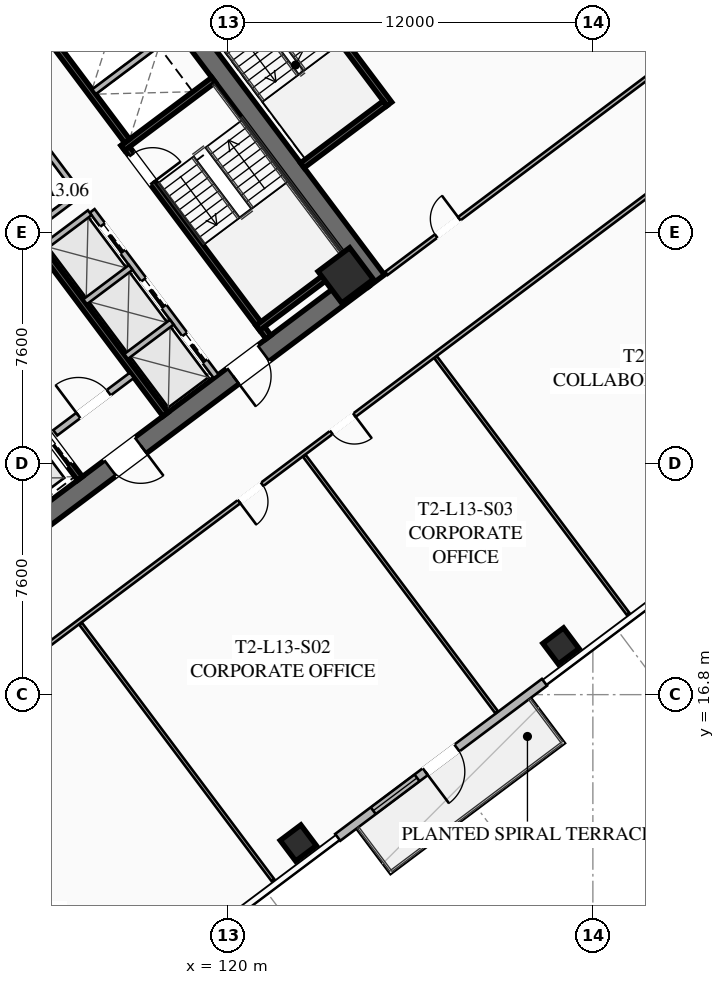
"""IFC4 building model, lengths in metres.
Left out: names, types, materials, properties, quantities, classifications, styles, units other than length and angle.
Written with IfcOpenShell. Run it as: python <this file> out.ifc"""

import sys

from ifc_helpers import new_model, si_unit, direction, frame, frame_2d, origin, origin_2d, place, context, subcontext, project, spatial, rectangle, hollow_rectangle, extrude, element, fill, save


model = new_model("IFC4")
c1 = context("Model", 3, precision=1e-05, world=origin(), true_north=direction((0.0, 1.0)))
c2 = subcontext(c1, "Body", "Model", "MODEL_VIEW")
j1 = project(units=[si_unit("LENGTHUNIT", "METRE"), si_unit("PLANEANGLEUNIT", "RADIAN")], contexts=[c1])
p1 = place(None, origin())
s1 = spatial("IfcSite", under=j1, at=p1, CompositionType="ELEMENT")
p2 = place(p1, origin())
s2 = spatial("IfcBuilding", under=s1, at=p2, CompositionType="ELEMENT")
p3 = place(p2, frame((0.0, 0.0, 53.0)))
s3 = spatial("IfcBuildingStorey", under=s2, at=p3, CompositionType="ELEMENT", Elevation=53.0)
p4 = place(p3, frame((115.524, 42.893, 0.0), z_axis=(0.0, 0.0, 1.0), x_axis=(0.600005007985, -0.799996243986, 0.0)))
e1 = element("IfcWall", 1, at=p4, inside=s3, PredefinedType="SHEAR", context=c2, shape_type="SweptSolid", body=[
    extrude(rectangle(XDim=15.6, YDim=0.65, at=frame_2d((7.8, 0.0))), origin(), (0.0, 0.0, 1.0), 3.55),
])
p5 = place(p3, frame((124.429, 30.478, 0.0), z_axis=(0.0, 0.0, 1.0), x_axis=(-0.799998028465, -0.600002628705, 0.0)))
e2 = element("IfcWall", 2, at=p5, inside=s3, PredefinedType="SHEAR", context=c2, shape_type="SweptSolid", body=[
    extrude(rectangle(XDim=14.86, YDim=0.65, at=frame_2d((7.43, 0.0))), origin(), (0.0, 0.0, 1.0), 3.55),
])
p6 = place(p5, frame((9.13, 0.0, 0.0)))
e3 = element("IfcOpeningElement", 3, at=p6, cuts=e2, PredefinedType="OPENING", context=c2, shape_type="SweptSolid", body=[
    extrude(rectangle(XDim=1.25, YDim=2.25, at=frame_2d((0.625, 1.125))), frame((0.0, 0.335, 0.0), z_axis=(0.0, -1.0, 0.0), x_axis=(1.0, 0.0, 0.0)), (0.0, 0.0, 1.0), 0.67),
])
p7 = place(p5, frame((4.08, 0.0, 0.0)))
e4 = element("IfcOpeningElement", 4, at=p7, cuts=e2, PredefinedType="OPENING", context=c2, shape_type="SweptSolid", body=[
    extrude(rectangle(XDim=1.25, YDim=2.25, at=frame_2d((0.625, 1.125))), frame((0.0, 0.335, 0.0), z_axis=(0.0, -1.0, 0.0), x_axis=(1.0, 0.0, 0.0)), (0.0, 0.0, 1.0), 0.67),
])
p8 = place(p3, frame((103.571, 33.522, 0.0), z_axis=(0.0, 0.0, 1.0), x_axis=(0.799998028465, 0.600002628705, 0.0)))
e5 = element("IfcWall", 5, at=p8, inside=s3, PredefinedType="SHEAR", context=c2, shape_type="SweptSolid", body=[
    extrude(rectangle(XDim=14.86, YDim=0.65, at=frame_2d((7.43, 0.0))), origin(), (0.0, 0.0, 1.0), 3.55),
])
p9 = place(p8, frame((4.48, 0.0, 0.0)))
e6 = element("IfcOpeningElement", 6, at=p9, cuts=e5, PredefinedType="OPENING", context=c2, shape_type="SweptSolid", body=[
    extrude(rectangle(XDim=1.25, YDim=2.25, at=frame_2d((0.625, 1.125))), frame((0.0, 0.335, 0.0), z_axis=(0.0, -1.0, 0.0), x_axis=(1.0, 0.0, 0.0)), (0.0, 0.0, 1.0), 0.67),
])
p10 = place(p8, frame((9.53, 0.0, 0.0)))
e7 = element("IfcOpeningElement", 7, at=p10, cuts=e5, PredefinedType="OPENING", context=c2, shape_type="SweptSolid", body=[
    extrude(rectangle(XDim=1.25, YDim=2.25, at=frame_2d((0.625, 1.125))), frame((0.0, 0.335, 0.0), z_axis=(0.0, -1.0, 0.0), x_axis=(1.0, 0.0, 0.0)), (0.0, 0.0, 1.0), 0.67),
])
p11 = place(p3, frame((123.87, 30.59, 0.0), z_axis=(0.0, 0.0, 1.0), x_axis=(0.799999996291, 0.600000004945, 0.0)))
e8 = element("IfcColumn", 8, at=p11, inside=s3, PredefinedType="COLUMN", context=c2, shape_type="SweptSolid", body=[
    extrude(hollow_rectangle(XDim=1.3, YDim=1.3, WallThickness=0.05, at=origin_2d()), origin(), (0.0, 0.0, 1.0), 3.35),
])
for number, where, z_axis, x_axis in (
    (9, (122.31, 11.92, 0.0), (0.0, 0.0, 1.0), (0.8, 0.6, 0.0)),
    (10, (130.95, 18.4, 0.0), (0.0, 0.0, 1.0), (0.8, 0.6, 0.0)),
):
    element("IfcColumn", number, at=place(p3, frame(where, z_axis=z_axis, x_axis=x_axis)), inside=s3, PredefinedType="COLUMN", context=c2, shape_type="SweptSolid", body=[
        extrude(hollow_rectangle(XDim=0.85, YDim=0.85, WallThickness=0.035, at=origin_2d()), origin(), (0.0, 0.0, 1.0), 3.35),
    ])
p12 = place(p3, frame((130.408, 17.206, 0.0), z_axis=(0.0, 0.0, 1.0), x_axis=(-0.799996553335, -0.600004595526, 0.0)))
e11 = element("IfcWall", 11, at=p12, inside=s3, PredefinedType="SOLIDWALL", context=c2, shape_type="SweptSolid", body=[
    extrude(rectangle(XDim=8.5, YDim=0.28, at=frame_2d((4.25, 0.0))), origin(), (0.0, 0.0, 1.0), 3.35),
])
p13 = place(p12, frame((3.6, 0.0, 0.0)))
e12 = element("IfcOpeningElement", 12, at=p13, cuts=e11, PredefinedType="OPENING", context=c2, shape_type="SweptSolid", body=[
    extrude(rectangle(XDim=1.3, YDim=2.15, at=frame_2d((0.65, 1.075))), frame((0.0, 0.15, 0.0), z_axis=(0.0, -1.0, 0.0), x_axis=(1.0, 0.0, 0.0)), (0.0, 0.0, 1.0), 0.3),
])
p14 = place(p12, frame((5.24, 0.0, 0.85)))
e13 = element("IfcOpeningElement", 13, at=p14, cuts=e11, PredefinedType="OPENING", context=c2, shape_type="SweptSolid", body=[
    extrude(rectangle(XDim=1.8, YDim=1.92, at=frame_2d((0.9, 0.96))), frame((0.0, 0.15, 0.0), z_axis=(0.0, -1.0, 0.0), x_axis=(1.0, 0.0, 0.0)), (0.0, 0.0, 1.0), 0.3),
])
p15 = place(p3, frame((116.56, 34.92, 0.0), z_axis=(0.0, 0.0, 1.0), x_axis=(0.600009827119, -0.799992629566, 0.0)))
e14 = element("IfcWall", 14, at=p15, inside=s3, PredefinedType="SHEAR", context=c2, shape_type="SweptSolid", body=[
    extrude(rectangle(XDim=7.95, YDim=0.2, at=frame_2d((3.975, 0.0))), origin(), (0.0, 0.0, 1.0), 3.35),
])
p16 = place(p15, frame((0.45, 0.0, 0.0)))
e15 = element("IfcOpeningElement", 15, at=p16, cuts=e14, PredefinedType="OPENING", context=c2, shape_type="SweptSolid", body=[
    extrude(rectangle(XDim=1.15, YDim=2.2, at=frame_2d((0.575, 1.1))), frame((0.0, 0.11, 0.0), z_axis=(0.0, -1.0, 0.0), x_axis=(1.0, 0.0, 0.0)), (0.0, 0.0, 1.0), 0.22),
])
for number, where, z_axis, x_axis in (
    (16, (116.54, 34.78, 0.0), (0.0, 0.0, 1.0), (0.8, 0.6, 0.0)),
    (17, (120.98, 28.86, 0.0), (0.0, 0.0, 1.0), (0.8, 0.6, 0.0)),
):
    element("IfcWall", number, at=place(p3, frame(where, z_axis=z_axis, x_axis=x_axis)), inside=s3, PredefinedType="SHEAR", context=c2, shape_type="SweptSolid", body=[
        extrude(rectangle(XDim=3.73, YDim=0.2, at=frame_2d((1.865, 0.0))), origin(), (0.0, 0.0, 1.0), 3.35),
    ])
p17 = place(p3, frame((117.938, 26.016, 0.0), z_axis=(0.0, 0.0, 1.0), x_axis=(-0.600005463273, 0.799995902516, 0.0)))
e18 = element("IfcWall", 18, at=p17, inside=s3, PredefinedType="SHEAR", context=c2, shape_type="SweptSolid", body=[
    extrude(rectangle(XDim=14.3, YDim=0.2, at=frame_2d((7.15, 0.0))), origin(), (0.0, 0.0, 1.0), 3.35),
])
p18 = place(p3, frame((114.316, 25.412, 0.0), z_axis=(0.0, 0.0, 1.0), x_axis=(0.800018601094, 0.59997519774, 0.0)))
e19 = element("IfcWall", 19, at=p18, inside=s3, PredefinedType="SOLIDWALL", context=c2, shape_type="SweptSolid", body=[
    extrude(rectangle(XDim=3.15, YDim=0.22, at=frame_2d((1.575, 0.0))), origin(), (0.0, 0.0, 1.0), 2.703),
])
p19 = place(p18, frame((0.95, 0.0, 0.0)))
e20 = element("IfcOpeningElement", 20, at=p19, cuts=e19, PredefinedType="OPENING", context=c2, shape_type="SweptSolid", body=[
    extrude(rectangle(XDim=1.25, YDim=2.25, at=frame_2d((0.625, 1.125))), frame((0.0, 0.12, 0.0), z_axis=(0.0, -1.0, 0.0), x_axis=(1.0, 0.0, 0.0)), (0.0, 0.0, 1.0), 0.24),
])
p20 = place(p3, frame((115.13, 23.91, 0.0), z_axis=(0.0, 0.0, 1.0), x_axis=(-0.599975393228, 0.800018454488, 0.0)))
e21 = element("IfcWall", 21, at=p20, inside=s3, PredefinedType="SHEAR", context=c2, shape_type="SweptSolid", body=[
    extrude(rectangle(XDim=6.35, YDim=0.2, at=frame_2d((3.175, 0.0))), origin(), (0.0, 0.0, 1.0), 3.35),
])
p21 = place(p20, frame((4.775, 0.0, 0.0)))
e22 = element("IfcOpeningElement", 22, at=p21, cuts=e21, PredefinedType="OPENING", context=c2, shape_type="SweptSolid", body=[
    extrude(rectangle(XDim=1.3, YDim=2.25, at=frame_2d((0.65, 1.125))), frame((0.0, 0.11, 0.0), z_axis=(0.0, -1.0, 0.0), x_axis=(1.0, 0.0, 0.0)), (0.0, 0.0, 1.0), 0.22),
])
p22 = place(p20, frame((2.775, 0.0, 0.0)))
e23 = element("IfcOpeningElement", 23, at=p22, cuts=e21, PredefinedType="OPENING", context=c2, shape_type="SweptSolid", body=[
    extrude(rectangle(XDim=1.3, YDim=2.25, at=frame_2d((0.65, 1.125))), frame((0.0, 0.11, 0.0), z_axis=(0.0, -1.0, 0.0), x_axis=(1.0, 0.0, 0.0)), (0.0, 0.0, 1.0), 0.22),
])
p23 = place(p20, frame((0.575, 0.0, 0.0)))
e24 = element("IfcOpeningElement", 24, at=p23, cuts=e21, PredefinedType="OPENING", context=c2, shape_type="SweptSolid", body=[
    extrude(rectangle(XDim=1.3, YDim=2.25, at=frame_2d((0.65, 1.125))), frame((0.0, 0.11, 0.0), z_axis=(0.0, -1.0, 0.0), x_axis=(1.0, 0.0, 0.0)), (0.0, 0.0, 1.0), 0.22),
])
p24 = place(p3, frame((112.87, 40.09, 0.0), z_axis=(0.0, 0.0, 1.0), x_axis=(0.599975393228, -0.800018454488, 0.0)))
e25 = element("IfcWall", 25, at=p24, inside=s3, PredefinedType="SHEAR", context=c2, shape_type="SweptSolid", body=[
    extrude(rectangle(XDim=6.35, YDim=0.2, at=frame_2d((3.175, 0.0))), origin(), (0.0, 0.0, 1.0), 3.35),
])
p25 = place(p3, frame((115.59, 36.63, 0.0), z_axis=(0.0, 0.0, 1.0), x_axis=(0.799973995579, 0.600034670996, 0.0)))
e26 = element("IfcWall", 26, at=p25, inside=s3, PredefinedType="SOLIDWALL", context=c2, shape_type="SweptSolid", body=[
    extrude(rectangle(XDim=3.38, YDim=0.2, at=frame_2d((1.69, 0.0))), origin(), (0.0, 0.0, 1.0), 3.35),
])
p26 = place(p3, frame((119.61, 27.27, 0.0), z_axis=(0.0, 0.0, 1.0), x_axis=(-0.600011488909, 0.79999138319, 0.0)))
e27 = element("IfcWall", 27, at=p26, inside=s3, PredefinedType="SOLIDWALL", context=c2, shape_type="SweptSolid", body=[
    extrude(rectangle(XDim=6.8, YDim=0.2, at=frame_2d((3.4, 0.0))), origin(), (0.0, 0.0, 1.0), 3.35),
])
p27 = place(p26, frame((0.625, 0.0, 0.0)))
e28 = element("IfcOpeningElement", 28, at=p27, cuts=e27, PredefinedType="OPENING", context=c2, shape_type="SweptSolid", body=[
    extrude(rectangle(XDim=1.1, YDim=2.2, at=frame_2d((0.55, 1.1))), frame((0.0, 0.11, 0.0), z_axis=(0.0, -1.0, 0.0), x_axis=(1.0, 0.0, 0.0)), (0.0, 0.0, 1.0), 0.22),
])
p28 = place(p26, frame((2.875, 0.0, 0.0)))
e29 = element("IfcOpeningElement", 29, at=p28, cuts=e27, PredefinedType="OPENING", context=c2, shape_type="SweptSolid", body=[
    extrude(rectangle(XDim=1.1, YDim=2.2, at=frame_2d((0.55, 1.1))), frame((0.0, 0.11, 0.0), z_axis=(0.0, -1.0, 0.0), x_axis=(1.0, 0.0, 0.0)), (0.0, 0.0, 1.0), 0.22),
])
p29 = place(p26, frame((5.125, 0.0, 0.0)))
e30 = element("IfcOpeningElement", 30, at=p29, cuts=e27, PredefinedType="OPENING", context=c2, shape_type="SweptSolid", body=[
    extrude(rectangle(XDim=1.1, YDim=2.2, at=frame_2d((0.55, 1.1))), frame((0.0, 0.11, 0.0), z_axis=(0.0, -1.0, 0.0), x_axis=(1.0, 0.0, 0.0)), (0.0, 0.0, 1.0), 0.22),
])
p30 = place(p3, frame((116.646, 27.922, 0.0), z_axis=(0.0, 0.0, 1.0), x_axis=(0.8, 0.6, 0.0)))
e31 = element("IfcWall", 31, at=p30, inside=s3, PredefinedType="SOLIDWALL", context=c2, shape_type="SweptSolid", body=[
    extrude(rectangle(XDim=1.88, YDim=0.2, at=frame_2d((0.94, 0.0))), origin(), (0.0, 0.0, 1.0), 3.35),
])
p31 = place(p3, frame((115.296, 29.722, 0.0), z_axis=(0.0, 0.0, 1.0), x_axis=(0.799984418148, 0.600020775241, 0.0)))
e32 = element("IfcWall", 32, at=p31, inside=s3, PredefinedType="SOLIDWALL", context=c2, shape_type="SweptSolid", body=[
    extrude(rectangle(XDim=1.88, YDim=0.2, at=frame_2d((0.94, 0.0))), origin(), (0.0, 0.0, 1.0), 3.35),
])
p32 = place(p3, frame((113.946, 31.522, 0.0), z_axis=(0.0, 0.0, 1.0), x_axis=(0.8, 0.6, 0.0)))
e33 = element("IfcWall", 33, at=p32, inside=s3, PredefinedType="SOLIDWALL", context=c2, shape_type="SweptSolid", body=[
    extrude(rectangle(XDim=1.88, YDim=0.2, at=frame_2d((0.94, 0.0))), origin(), (0.0, 0.0, 1.0), 3.35),
])
p33 = place(p3, frame((115.11, 33.27, 0.0), z_axis=(0.0, 0.0, 1.0), x_axis=(-0.600011488909, 0.79999138319, 0.0)))
e34 = element("IfcWall", 34, at=p33, inside=s3, PredefinedType="SOLIDWALL", context=c2, shape_type="SweptSolid", body=[
    extrude(rectangle(XDim=6.8, YDim=0.2, at=frame_2d((3.4, 0.0))), origin(), (0.0, 0.0, 1.0), 3.35),
])
p34 = place(p3, frame((113.526, 32.082, 0.0), z_axis=(0.0, 0.0, 1.0), x_axis=(0.800046745961, 0.599937666993, 0.0)))
e35 = element("IfcWall", 35, at=p34, inside=s3, PredefinedType="SOLIDWALL", context=c2, shape_type="SweptSolid", body=[
    extrude(rectangle(XDim=1.88, YDim=0.2, at=frame_2d((0.94, 0.0))), origin(), (0.0, 0.0, 1.0), 3.35),
])
p35 = place(p3, frame((125.304, 36.228, 0.0), z_axis=(0.0, 0.0, 1.0), x_axis=(-0.59998851072, 0.800008616831, 0.0)))
e36 = element("IfcWall", 36, at=p35, inside=s3, PredefinedType="SHEAR", context=c2, shape_type="SweptSolid", body=[
    extrude(rectangle(XDim=6.8, YDim=0.2, at=frame_2d((3.4, 0.0))), origin(), (0.0, 0.0, 1.0), 3.35),
])
p36 = place(p3, frame((122.444, 34.208, 0.0), z_axis=(0.0, 0.0, 1.0), x_axis=(0.79999138319, 0.600011488909, 0.0)))
e37 = element("IfcWall", 37, at=p36, inside=s3, PredefinedType="SHEAR", context=c2, shape_type="SweptSolid", body=[
    extrude(rectangle(XDim=3.4, YDim=0.2, at=frame_2d((1.7, 0.0))), origin(), (0.0, 0.0, 1.0), 3.35),
])
p37 = place(p3, frame((98.276, 33.832, 0.0), z_axis=(0.0, 0.0, 1.0), x_axis=(0.800001944698, 0.59999740706, 0.0)))
e38 = element("IfcWall", 38, at=p37, inside=s3, PredefinedType="PARTITIONING", context=c2, shape_type="SweptSolid", body=[
    extrude(rectangle(XDim=30.13, YDim=0.135, at=frame_2d((15.065, 0.0))), origin(), (0.0, 0.0, 1.0), 2.703),
])
p38 = place(p37, frame((0.3, 0.0, 0.0)))
e39 = element("IfcOpeningElement", 39, at=p38, cuts=e38, PredefinedType="OPENING", context=c2, shape_type="SweptSolid", body=[
    extrude(rectangle(XDim=0.95, YDim=2.05, at=frame_2d((0.475, 1.025))), frame((0.0, 0.077, 0.0), z_axis=(0.0, -1.0, 0.0), x_axis=(1.0, 0.0, 0.0)), (0.0, 0.0, 1.0), 0.155),
])
p39 = place(p37, frame((10.95, 0.0, 0.0)))
e40 = element("IfcOpeningElement", 40, at=p39, cuts=e38, PredefinedType="OPENING", context=c2, shape_type="SweptSolid", body=[
    extrude(rectangle(XDim=0.95, YDim=2.05, at=frame_2d((0.475, 1.025))), frame((0.0, 0.077, 0.0), z_axis=(0.0, -1.0, 0.0), x_axis=(1.0, 0.0, 0.0)), (0.0, 0.0, 1.0), 0.155),
])
p40 = place(p37, frame((14.95, 0.0, 0.0)))
e41 = element("IfcOpeningElement", 41, at=p40, cuts=e38, PredefinedType="OPENING", context=c2, shape_type="SweptSolid", body=[
    extrude(rectangle(XDim=0.95, YDim=2.05, at=frame_2d((0.475, 1.025))), frame((0.0, 0.077, 0.0), z_axis=(0.0, -1.0, 0.0), x_axis=(1.0, 0.0, 0.0)), (0.0, 0.0, 1.0), 0.155),
])
p41 = place(p37, frame((28.88, 0.0, 0.0)))
e42 = element("IfcOpeningElement", 42, at=p41, cuts=e38, PredefinedType="OPENING", context=c2, shape_type="SweptSolid", body=[
    extrude(rectangle(XDim=0.95, YDim=2.05, at=frame_2d((0.475, 1.025))), frame((0.0, 0.077, 0.0), z_axis=(0.0, -1.0, 0.0), x_axis=(1.0, 0.0, 0.0)), (0.0, 0.0, 1.0), 0.155),
])
p42 = place(p3, frame((135.46, 34.47, 0.0), z_axis=(0.0, 0.0, 1.0), x_axis=(-0.800001944698, -0.59999740706, 0.0)))
e43 = element("IfcWall", 43, at=p42, inside=s3, PredefinedType="PARTITIONING", context=c2, shape_type="SweptSolid", body=[
    extrude(rectangle(XDim=30.13, YDim=0.135, at=frame_2d((15.065, 0.0))), origin(), (0.0, 0.0, 1.0), 2.703),
])
p43 = place(p42, frame((28.8, 0.0, 0.0)))
e44 = element("IfcOpeningElement", 44, at=p43, cuts=e43, PredefinedType="OPENING", context=c2, shape_type="SweptSolid", body=[
    extrude(rectangle(XDim=0.95, YDim=2.05, at=frame_2d((0.475, 1.025))), frame((0.0, 0.077, 0.0), z_axis=(0.0, -1.0, 0.0), x_axis=(1.0, 0.0, 0.0)), (0.0, 0.0, 1.0), 0.155),
])
p44 = place(p42, frame((17.921, 0.0, 0.0)))
e45 = element("IfcOpeningElement", 45, at=p44, cuts=e43, PredefinedType="OPENING", context=c2, shape_type="SweptSolid", body=[
    extrude(rectangle(XDim=0.95, YDim=2.05, at=frame_2d((0.475, 1.025))), frame((0.0, 0.077, 0.0), z_axis=(0.0, -1.0, 0.0), x_axis=(1.0, 0.0, 0.0)), (0.0, 0.0, 1.0), 0.155),
])
p45 = place(p42, frame((14.129, 0.0, 0.0)))
e46 = element("IfcOpeningElement", 46, at=p45, cuts=e43, PredefinedType="OPENING", context=c2, shape_type="SweptSolid", body=[
    extrude(rectangle(XDim=0.95, YDim=2.05, at=frame_2d((0.475, 1.025))), frame((0.0, 0.077, 0.0), z_axis=(0.0, -1.0, 0.0), x_axis=(1.0, 0.0, 0.0)), (0.0, 0.0, 1.0), 0.155),
])
p46 = place(p42, frame((0.38, 0.0, 0.0)))
e47 = element("IfcOpeningElement", 47, at=p46, cuts=e43, PredefinedType="OPENING", context=c2, shape_type="SweptSolid", body=[
    extrude(rectangle(XDim=0.95, YDim=2.05, at=frame_2d((0.475, 1.025))), frame((0.0, 0.077, 0.0), z_axis=(0.0, -1.0, 0.0), x_axis=(1.0, 0.0, 0.0)), (0.0, 0.0, 1.0), 0.155),
])
p47 = place(p3, frame((121.478, 10.696, 0.0), z_axis=(0.0, 0.0, 1.0), x_axis=(-0.600007405188, 0.799994446056, 0.0)))
e48 = element("IfcWall", 48, at=p47, inside=s3, PredefinedType="PARTITIONING", context=c2, shape_type="SweptSolid", body=[
    extrude(rectangle(XDim=10.55, YDim=0.11, at=frame_2d((5.275, 0.0))), origin(), (0.0, 0.0, 1.0), 2.703),
])
p48 = place(p3, frame((128.838, 16.216, 0.0), z_axis=(0.0, 0.0, 1.0), x_axis=(-0.599992594658, 0.800005553953, 0.0)))
e49 = element("IfcWall", 49, at=p48, inside=s3, PredefinedType="PARTITIONING", context=c2, shape_type="SweptSolid", body=[
    extrude(rectangle(XDim=10.55, YDim=0.11, at=frame_2d((5.275, 0.0))), origin(), (0.0, 0.0, 1.0), 2.703),
])
p49 = place(p3, frame((133.158, 19.456, 0.0), z_axis=(0.0, 0.0, 1.0), x_axis=(-0.600007405188, 0.799994446056, 0.0)))
e50 = element("IfcWall", 50, at=p49, inside=s3, PredefinedType="PARTITIONING", context=c2, shape_type="SweptSolid", body=[
    extrude(rectangle(XDim=10.55, YDim=0.11, at=frame_2d((5.275, 0.0))), origin(), (0.0, 0.0, 1.0), 2.703),
])
p50 = place(p3, frame((125.208, 30.656, 0.0), z_axis=(0.0, 0.0, 1.0), x_axis=(0.799995666112, 0.600005778473, 0.0)))
e51 = element("IfcWall", 51, at=p50, inside=s3, PredefinedType="PARTITIONING", context=c2, shape_type="SweptSolid", body=[
    extrude(rectangle(XDim=13.52, YDim=0.135, at=frame_2d((6.76, 0.0))), origin(), (0.0, 0.0, 1.0), 2.703),
])
p51 = place(p50, frame((2.045, 0.0, 0.0)))
e52 = element("IfcOpeningElement", 52, at=p51, cuts=e51, PredefinedType="OPENING", context=c2, shape_type="SweptSolid", body=[
    extrude(rectangle(XDim=0.95, YDim=2.05, at=frame_2d((0.475, 1.025))), frame((0.0, 0.077, 0.0), z_axis=(0.0, -1.0, 0.0), x_axis=(1.0, 0.0, 0.0)), (0.0, 0.0, 1.0), 0.155),
])
p52 = place(p13, origin())
e53 = element("IfcDoor", 53, at=p52, inside=s3, OperationType="SINGLE_SWING_RIGHT", PredefinedType="DOOR", context=c2, shape_type="SweptSolid", body=[
    extrude(rectangle(XDim=1.3, YDim=2.15, at=frame_2d((0.65, 1.075))), frame((0.0, 0.025, 0.0), z_axis=(0.0, -1.0, 0.0), x_axis=(1.0, 0.0, 0.0)), (0.0, 0.0, 1.0), 0.05),
])
fill(e12, e53)
p53 = place(p14, origin())
e54 = element("IfcWindow", 54, at=p53, inside=s3, PartitioningType="SINGLE_PANEL", PredefinedType="WINDOW", context=c2, shape_type="SweptSolid", body=[
    extrude(rectangle(XDim=1.8, YDim=1.92, at=frame_2d((0.9, 0.96))), frame((0.0, 0.03, 0.0), z_axis=(0.0, -1.0, 0.0), x_axis=(1.0, 0.0, 0.0)), (0.0, 0.0, 1.0), 0.06),
])
fill(e13, e54)
p54 = place(p6, origin())
e55 = element("IfcDoor", 55, at=p54, inside=s3, OperationType="SINGLE_SWING_LEFT", PredefinedType="DOOR", context=c2, shape_type="SweptSolid", body=[
    extrude(rectangle(XDim=1.25, YDim=2.25, at=frame_2d((0.625, 1.125))), frame((0.0, 0.025, 0.0), z_axis=(0.0, -1.0, 0.0), x_axis=(1.0, 0.0, 0.0)), (0.0, 0.0, 1.0), 0.05),
])
fill(e3, e55)
p55 = place(p7, origin())
e56 = element("IfcDoor", 56, at=p55, inside=s3, OperationType="SINGLE_SWING_RIGHT", PredefinedType="DOOR", context=c2, shape_type="SweptSolid", body=[
    extrude(rectangle(XDim=1.25, YDim=2.25, at=frame_2d((0.625, 1.125))), frame((0.0, 0.025, 0.0), z_axis=(0.0, -1.0, 0.0), x_axis=(1.0, 0.0, 0.0)), (0.0, 0.0, 1.0), 0.05),
])
fill(e4, e56)
p56 = place(p16, origin())
e57 = element("IfcDoor", 57, at=p56, inside=s3, OperationType="SINGLE_SWING_RIGHT", PredefinedType="DOOR", context=c2, shape_type="SweptSolid", body=[
    extrude(rectangle(XDim=1.15, YDim=2.2, at=frame_2d((0.575, 1.1))), frame((0.0, 0.025, 0.0), z_axis=(0.0, -1.0, 0.0), x_axis=(1.0, 0.0, 0.0)), (0.0, 0.0, 1.0), 0.05),
])
fill(e15, e57)
p57 = place(p19, origin())
e58 = element("IfcDoor", 58, at=p57, inside=s3, OperationType="SINGLE_SWING_LEFT", PredefinedType="DOOR", context=c2, shape_type="SweptSolid", body=[
    extrude(rectangle(XDim=1.25, YDim=2.25, at=frame_2d((0.625, 1.125))), frame((0.0, 0.025, 0.0), z_axis=(0.0, -1.0, 0.0), x_axis=(1.0, 0.0, 0.0)), (0.0, 0.0, 1.0), 0.05),
])
fill(e20, e58)
p58 = place(p44, origin())
e59 = element("IfcDoor", 59, at=p58, inside=s3, OperationType="SINGLE_SWING_RIGHT", PredefinedType="DOOR", context=c2, shape_type="SweptSolid", body=[
    extrude(rectangle(XDim=0.95, YDim=2.05, at=frame_2d((0.475, 1.025))), frame((0.0, 0.025, 0.0), z_axis=(0.0, -1.0, 0.0), x_axis=(1.0, 0.0, 0.0)), (0.0, 0.0, 1.0), 0.05),
])
fill(e45, e59)
p59 = place(p45, origin())
e60 = element("IfcDoor", 60, at=p59, inside=s3, OperationType="SINGLE_SWING_LEFT", PredefinedType="DOOR", context=c2, shape_type="SweptSolid", body=[
    extrude(rectangle(XDim=0.95, YDim=2.05, at=frame_2d((0.475, 1.025))), frame((0.0, 0.025, 0.0), z_axis=(0.0, -1.0, 0.0), x_axis=(1.0, 0.0, 0.0)), (0.0, 0.0, 1.0), 0.05),
])
fill(e46, e60)
p60 = place(p51, origin())
e61 = element("IfcDoor", 61, at=p60, inside=s3, OperationType="SINGLE_SWING_RIGHT", PredefinedType="DOOR", context=c2, shape_type="SweptSolid", body=[
    extrude(rectangle(XDim=0.95, YDim=2.05, at=frame_2d((0.475, 1.025))), frame((0.0, 0.025, 0.0), z_axis=(0.0, -1.0, 0.0), x_axis=(1.0, 0.0, 0.0)), (0.0, 0.0, 1.0), 0.05),
])
fill(e52, e61)
p61 = place(p23, origin())
e62 = element("IfcDoor", 62, at=p61, inside=s3, OperationType="SLIDING_TO_LEFT", PredefinedType="DOOR", context=c2, shape_type="SweptSolid", body=[
    extrude(rectangle(XDim=1.3, YDim=2.25, at=frame_2d((0.65, 1.125))), frame((0.0, 0.025, 0.0), z_axis=(0.0, -1.0, 0.0), x_axis=(1.0, 0.0, 0.0)), (0.0, 0.0, 1.0), 0.05),
])
fill(e24, e62)
p62 = place(p27, origin())
e63 = element("IfcDoor", 63, at=p62, inside=s3, OperationType="SLIDING_TO_LEFT", PredefinedType="DOOR", context=c2, shape_type="SweptSolid", body=[
    extrude(rectangle(XDim=1.1, YDim=2.2, at=frame_2d((0.55, 1.1))), frame((0.0, 0.025, 0.0), z_axis=(0.0, -1.0, 0.0), x_axis=(1.0, 0.0, 0.0)), (0.0, 0.0, 1.0), 0.05),
])
fill(e28, e63)
p63 = place(p28, origin())
e64 = element("IfcDoor", 64, at=p63, inside=s3, OperationType="SLIDING_TO_LEFT", PredefinedType="DOOR", context=c2, shape_type="SweptSolid", body=[
    extrude(rectangle(XDim=1.1, YDim=2.2, at=frame_2d((0.55, 1.1))), frame((0.0, 0.025, 0.0), z_axis=(0.0, -1.0, 0.0), x_axis=(1.0, 0.0, 0.0)), (0.0, 0.0, 1.0), 0.05),
])
fill(e29, e64)
p64 = place(p29, origin())
e65 = element("IfcDoor", 65, at=p64, inside=s3, OperationType="SLIDING_TO_LEFT", PredefinedType="DOOR", context=c2, shape_type="SweptSolid", body=[
    extrude(rectangle(XDim=1.1, YDim=2.2, at=frame_2d((0.55, 1.1))), frame((0.0, 0.025, 0.0), z_axis=(0.0, -1.0, 0.0), x_axis=(1.0, 0.0, 0.0)), (0.0, 0.0, 1.0), 0.05),
])
fill(e30, e65)
save(model, sys.argv[1])
